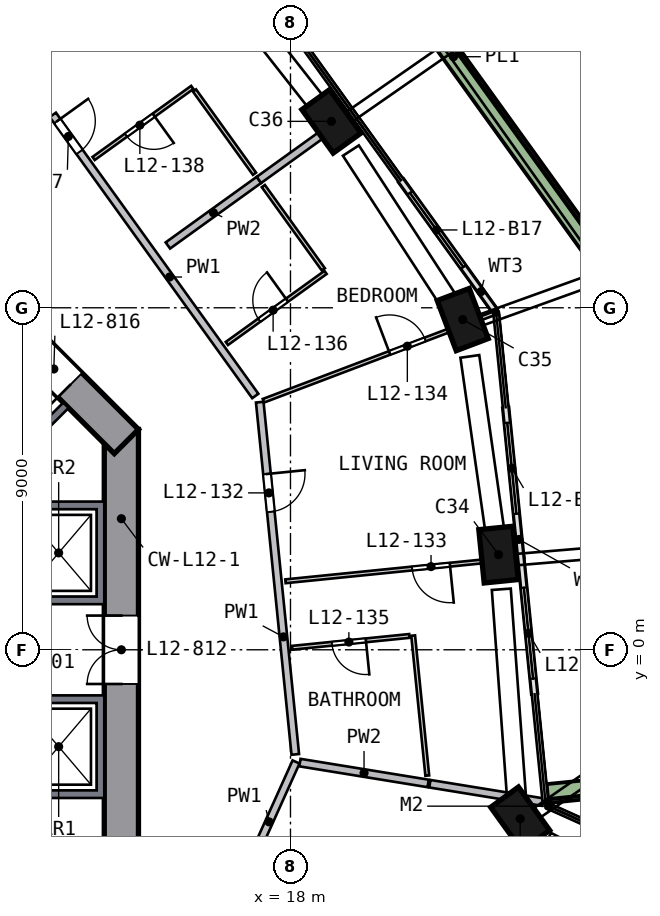
"""IFC4 building model, lengths in metres.
Left out: names, types, materials, properties, quantities, classifications, styles, units other than length and angle.
Written with IfcOpenShell. Run it as: python <this file> out.ifc"""

import sys

from ifc_helpers import new_model, si_unit, direction, frame, frame_2d, origin, origin_2d, place, context, subcontext, project, spatial, polyline, rectangle, outline, extrude, element, fill, save


model = new_model("IFC4")
c1 = context("Model", 3, precision=1e-05, world=origin(), true_north=direction((0.0, 1.0)))
c2 = subcontext(c1, "Body", "Model", "MODEL_VIEW")
j1 = project(units=[si_unit("LENGTHUNIT", "METRE"), si_unit("PLANEANGLEUNIT", "RADIAN")], contexts=[c1])
p1 = place(None, origin())
s1 = spatial("IfcSite", under=j1, at=p1, CompositionType="ELEMENT")
p2 = place(p1, origin())
s2 = spatial("IfcBuilding", under=s1, at=p2, CompositionType="ELEMENT")
p3 = place(p2, frame((0.0, 0.0, 56.5)))
s3 = spatial("IfcBuildingStorey", under=s2, at=p3, CompositionType="ELEMENT", Elevation=56.5)
p4 = place(p3, frame((24.02, -4.586, 0.0), z_axis=(0.020828195, 0.114403043, 0.993216054), x_axis=(0.588137095, -0.804758769, 0.080362191)))
e1 = element("IfcColumn", 1, at=p4, inside=s3, PredefinedType="COLUMN", context=c2, shape_type="SweptSolid", body=[
    extrude(rectangle(XDim=1.4, YDim=0.9, at=origin_2d()), origin(), (0.0, 0.0, 1.0), 3.212),
])
p5 = place(p3, frame((23.489, 2.369, 0.0), z_axis=(-0.012168058, 0.111641928, 0.993674), x_axis=(-0.09927897, 0.988702484, -0.112299088)))
e2 = element("IfcColumn", 2, at=p5, inside=s3, PredefinedType="COLUMN", context=c2, shape_type="SweptSolid", body=[
    extrude(rectangle(XDim=1.4, YDim=0.9, at=origin_2d()), origin(), (0.0, 0.0, 1.0), 3.21),
])
p6 = place(p3, frame((22.583, 8.561, 0.0), z_axis=(-0.041587396, 0.10704763, 0.993383759), x_axis=(0.351857103, -0.928982675, 0.11483801)))
e3 = element("IfcColumn", 3, at=p6, inside=s3, PredefinedType="COLUMN", context=c2, shape_type="SweptSolid", body=[
    extrude(rectangle(XDim=1.4, YDim=0.9, at=origin_2d()), origin(), (0.0, 0.0, 1.0), 3.211),
])
p7 = place(p3, frame((19.157, 13.796, 0.0), z_axis=(-0.066391509, 0.090651408, 0.993667193), x_axis=(-0.580299679, 0.806614945, -0.112359302)))
e4 = element("IfcColumn", 4, at=p7, inside=s3, PredefinedType="COLUMN", context=c2, shape_type="SweptSolid", body=[
    extrude(rectangle(XDim=1.4, YDim=0.9, at=origin_2d()), origin(), (0.0, 0.0, 1.0), 3.21),
])
p8 = place(p3, frame((13.55, -5.799, 0.0), z_axis=(0.0, 0.0, 1.0), x_axis=(0.0, 1.0, 0.0)))
e5 = element("IfcWall", 5, at=p8, inside=s3, PredefinedType="SHEAR", context=c2, shape_type="SweptSolid", body=[
    extrude(rectangle(XDim=11.598, YDim=0.9, at=frame_2d((5.799, 0.0))), origin(), (0.0, 0.0, 1.0), 3.5),
])
p9 = place(p8, frame((4.899, 0.0, 0.0)))
e6 = element("IfcOpeningElement", 6, at=p9, cuts=e5, PredefinedType="OPENING", context=c2, shape_type="SweptSolid", body=[
    extrude(rectangle(XDim=1.8, YDim=2.1, at=frame_2d((0.9, 1.05))), frame((0.0, 0.46, 0.0), z_axis=(0.0, -1.0, 0.0), x_axis=(1.0, 0.0, 0.0)), (0.0, 0.0, 1.0), 0.92),
])
p10 = place(p3, frame((13.682, 5.481, 0.0), z_axis=(0.0, 0.0, 1.0), x_axis=(-0.707106781, 0.707106781, 0.0)))
e7 = element("IfcWall", 7, at=p10, inside=s3, PredefinedType="SHEAR", context=c2, shape_type="SweptSolid", body=[
    extrude(rectangle(XDim=11.598, YDim=0.9, at=frame_2d((5.799, 0.0))), origin(), (0.0, 0.0, 1.0), 3.5),
])
p11 = place(p10, frame((2.099, 0.0, 0.0)))
e8 = element("IfcOpeningElement", 8, at=p11, cuts=e7, PredefinedType="OPENING", context=c2, shape_type="SweptSolid", body=[
    extrude(rectangle(XDim=1.2, YDim=2.1, at=frame_2d((0.6, 1.05))), frame((0.0, 0.46, 0.0), z_axis=(0.0, -1.0, 0.0), x_axis=(1.0, 0.0, 0.0)), (0.0, 0.0, 1.0), 0.92),
])
p12 = place(p3, frame((24.423, -1.155, 0.0), z_axis=(0.0, 0.0, 1.0), x_axis=(-0.100369865, 0.994950195, 0.0)))
e9 = element("IfcWall", 9, at=p12, inside=s3, PredefinedType="SOLIDWALL", context=c2, shape_type="SweptSolid", body=[
    extrude(rectangle(XDim=3.6, YDim=0.15, at=frame_2d((1.8, 0.0))), origin(), (0.0, 0.0, 1.0), 2.425),
])
p13 = place(p12, frame((0.4, 0.0, 0.0)))
e10 = element("IfcOpeningElement", 10, at=p13, cuts=e9, PredefinedType="OPENING", context=c2, shape_type="SweptSolid", body=[
    extrude(rectangle(XDim=2.4, YDim=2.4, at=frame_2d((1.2, 1.2))), frame((0.0, 0.085, 0.0), z_axis=(0.0, -1.0, 0.0), x_axis=(1.0, 0.0, 0.0)), (0.0, 0.0, 1.0), 0.17),
])
p14 = place(p3, frame((24.061, 2.427, 0.0), z_axis=(0.0, 0.0, 1.0), x_axis=(-0.100352013, 0.994951996, 0.0)))
e11 = element("IfcWall", 11, at=p14, inside=s3, PredefinedType="SOLIDWALL", context=c2, shape_type="SweptSolid", body=[
    extrude(rectangle(XDim=3.961, YDim=0.15, at=frame_2d((1.98, 0.0))), origin(), (0.0, 0.0, 1.0), 2.425),
])
p15 = place(p14, frame((1.16, 0.0, 0.0)))
e12 = element("IfcOpeningElement", 12, at=p15, cuts=e11, PredefinedType="OPENING", context=c2, shape_type="SweptSolid", body=[
    extrude(rectangle(XDim=2.4, YDim=2.4, at=frame_2d((1.2, 1.2))), frame((0.0, 0.085, 0.0), z_axis=(0.0, -1.0, 0.0), x_axis=(1.0, 0.0, 0.0)), (0.0, 0.0, 1.0), 0.17),
])
p16 = place(p3, frame((23.364, 8.939, 0.0), z_axis=(0.0, 0.0, 1.0), x_axis=(-0.584369059, 0.811488018, 0.0)))
e13 = element("IfcWall", 13, at=p16, inside=s3, PredefinedType="SOLIDWALL", context=c2, shape_type="SweptSolid", body=[
    extrude(rectangle(XDim=4.199, YDim=0.15, at=frame_2d((2.099, 0.0))), origin(), (0.0, 0.0, 1.0), 2.425),
])
p17 = place(p16, frame((1.399, 0.0, 0.0)))
e14 = element("IfcOpeningElement", 14, at=p17, cuts=e13, PredefinedType="OPENING", context=c2, shape_type="SweptSolid", body=[
    extrude(rectangle(XDim=2.4, YDim=2.4, at=frame_2d((1.2, 1.2))), frame((0.0, 0.085, 0.0), z_axis=(0.0, -1.0, 0.0), x_axis=(1.0, 0.0, 0.0)), (0.0, 0.0, 1.0), 0.17),
])
p18 = place(p3, frame((24.764, -3.784, 0.0), z_axis=(0.0, 0.0, 1.0), x_axis=(0.994951439, 0.100357532, 0.0)))
e15 = element("IfcWall", 15, at=p18, inside=s3, PredefinedType="SOLIDWALL", context=c2, shape_type="SweptSolid", body=[
    extrude(rectangle(XDim=3.199, YDim=0.5, at=frame_2d((1.6, 0.0))), origin(), (0.0, 0.0, 1.0), 0.7),
])
p19 = place(p3, frame((26.3, 10.039, 0.0), z_axis=(0.0, 0.0, 1.0), x_axis=(-0.5843858, 0.811475962, 0.0)))
e16 = element("IfcWall", 16, at=p19, inside=s3, PredefinedType="SOLIDWALL", context=c2, shape_type="SweptSolid", body=[
    extrude(rectangle(XDim=13.723, YDim=0.5, at=frame_2d((6.862, 0.0))), origin(), (0.0, 0.0, 1.0), 0.7),
])
p20 = place(p3, origin())
e17 = element("IfcWall", 17, at=p20, inside=s3, PredefinedType="SOLIDWALL", context=c2, shape_type="SweptSolid", body=[
    extrude(outline(polyline([(13.1, -3.9), (10.9, -3.9), (10.9, -3.7), (12.9, -3.7), (12.9, -1.4), (10.9, -1.4), (10.9, -1.2), (13.1, -1.2), (13.1, -3.9)])), origin(), (0.0, 0.0, 1.0), 3.19),
])
p21 = place(p3, origin())
e18 = element("IfcWall", 18, at=p21, inside=s3, PredefinedType="SOLIDWALL", context=c2, shape_type="SweptSolid", body=[
    extrude(outline(polyline([(13.1, 3.9), (13.1, 1.2), (10.9, 1.2), (10.9, 1.4), (12.9, 1.4), (12.9, 3.7), (10.9, 3.7), (10.9, 3.9), (13.1, 3.9)])), origin(), (0.0, 0.0, 1.0), 3.19),
])
for number, where, z_axis, x_axis in (
    (19, (9.334, 3.677, 0.0), (0.0, 0.0, 1.0), (0.707, 0.707, 0.0)),
    (20, (9.334, -3.677, 0.0), (0.0, 0.0, 1.0), (0.707, -0.707, 0.0)),
):
    element("IfcWall", number, at=place(p3, frame(where, z_axis=z_axis, x_axis=x_axis)), inside=s3, PredefinedType="SOLIDWALL", context=c2, shape_type="SweptSolid", body=[
        extrude(rectangle(XDim=3.9, YDim=0.2, at=frame_2d((1.95, 0.0))), origin(), (0.0, 0.0, 1.0), 3.19),
    ])
p22 = place(p3, frame((11.747, 14.076, 0.0), z_axis=(0.0, 0.0, 1.0), x_axis=(0.584392911, -0.811470841, 0.0)))
e21 = element("IfcWall", 21, at=p22, inside=s3, PredefinedType="SOLIDWALL", context=c2, shape_type="SweptSolid", body=[
    extrude(rectangle(XDim=9.116, YDim=0.2, at=frame_2d((4.558, 0.0))), origin(), (0.0, 0.0, 1.0), 3.19),
])
p23 = place(p22, frame((0.2, 0.0, 0.0)))
e22 = element("IfcOpeningElement", 22, at=p23, cuts=e21, PredefinedType="OPENING", context=c2, shape_type="SweptSolid", body=[
    extrude(rectangle(XDim=1.0, YDim=2.1, at=frame_2d((0.5, 1.05))), frame((0.0, 0.11, 0.0), z_axis=(0.0, -1.0, 0.0), x_axis=(1.0, 0.0, 0.0)), (0.0, 0.0, 1.0), 0.22),
])
p24 = place(p3, frame((16.726, -6.105, 0.0), z_axis=(0.0, 0.0, 1.0), x_axis=(0.410561327, 0.911832988, 0.0)))
e23 = element("IfcWall", 23, at=p24, inside=s3, PredefinedType="SOLIDWALL", context=c2, shape_type="SweptSolid", body=[
    extrude(rectangle(XDim=3.458, YDim=0.2, at=frame_2d((1.729, 0.0))), origin(), (0.0, 0.0, 1.0), 3.19),
])
p25 = place(p3, frame((17.191, 6.517, 0.0), z_axis=(0.0, 0.0, 1.0), x_axis=(0.100362456, -0.994950942, 0.0)))
e24 = element("IfcWall", 24, at=p25, inside=s3, PredefinedType="SOLIDWALL", context=c2, shape_type="SweptSolid", body=[
    extrude(rectangle(XDim=9.317, YDim=0.2, at=frame_2d((4.658, 0.0))), origin(), (0.0, 0.0, 1.0), 3.19),
])
p26 = place(p25, frame((1.9, 0.0, 0.0)))
e25 = element("IfcOpeningElement", 25, at=p26, cuts=e24, PredefinedType="OPENING", context=c2, shape_type="SweptSolid", body=[
    extrude(rectangle(XDim=1.0, YDim=2.1, at=frame_2d((0.5, 1.05))), frame((0.0, 0.11, 0.0), z_axis=(0.0, -1.0, 0.0), x_axis=(1.0, 0.0, 0.0)), (0.0, 0.0, 1.0), 0.22),
])
p27 = place(p3, frame((14.773, 10.639, 0.0), z_axis=(0.0, 0.0, 1.0), x_axis=(0.811487293, 0.584370065, 0.0)))
e26 = element("IfcWall", 26, at=p27, inside=s3, PredefinedType="SOLIDWALL", context=c2, shape_type="SweptSolid", body=[
    extrude(rectangle(XDim=2.953, YDim=0.2, at=frame_2d((1.477, 0.0))), origin(), (0.0, 0.0, 1.0), 3.19),
])
p28 = place(p3, frame((17.169, 12.365, 0.0), z_axis=(0.0, 0.0, 1.0), x_axis=(0.811479396, 0.584381032, 0.0)))
e27 = element("IfcWall", 27, at=p28, inside=s3, PredefinedType="SOLIDWALL", context=c2, shape_type="SweptSolid", body=[
    extrude(rectangle(XDim=2.95, YDim=0.2, at=frame_2d((1.475, 0.0))), origin(), (0.0, 0.0, 1.0), 3.19),
])
p29 = place(p3, frame((18.248, -2.969, 0.0), z_axis=(0.0, 0.0, 1.0), x_axis=(0.987029122, -0.160541311, 0.0)))
e28 = element("IfcWall", 28, at=p29, inside=s3, PredefinedType="SOLIDWALL", context=c2, shape_type="SweptSolid", body=[
    extrude(rectangle(XDim=3.419, YDim=0.2, at=frame_2d((1.709, 0.0))), origin(), (0.0, 0.0, 1.0), 3.19),
])
p30 = place(p3, frame((21.668, -3.525, 0.0), z_axis=(0.0, 0.0, 1.0), x_axis=(0.987019825, -0.160598462, 0.0)))
e29 = element("IfcWall", 29, at=p30, inside=s3, PredefinedType="SOLIDWALL", context=c2, shape_type="SweptSolid", body=[
    extrude(rectangle(XDim=3.011, YDim=0.2, at=frame_2d((1.506, 0.0))), origin(), (0.0, 0.0, 1.0), 3.19),
])
p31 = place(p3, frame((15.416, 14.799, 0.0), z_axis=(0.0, 0.0, 1.0), x_axis=(-0.811459086, -0.584409233, 0.0)))
e30 = element("IfcWall", 30, at=p31, inside=s3, PredefinedType="PARTITIONING", context=c2, shape_type="SweptSolid", body=[
    extrude(rectangle(XDim=3.2, YDim=0.1, at=frame_2d((1.6, 0.0))), origin(), (0.0, 0.0, 1.0), 3.19),
])
p32 = place(p31, frame((1.25, 0.0, 0.0)))
e31 = element("IfcOpeningElement", 31, at=p32, cuts=e30, PredefinedType="OPENING", context=c2, shape_type="SweptSolid", body=[
    extrude(rectangle(XDim=0.9, YDim=2.1, at=frame_2d((0.45, 1.05))), frame((0.0, 0.06, 0.0), z_axis=(0.0, -1.0, 0.0), x_axis=(1.0, 0.0, 0.0)), (0.0, 0.0, 1.0), 0.12),
])
p33 = place(p3, frame((15.475, 14.718, 0.0), z_axis=(0.0, 0.0, 1.0), x_axis=(0.58440715, -0.811460586, 0.0)))
e32 = element("IfcWall", 32, at=p33, inside=s3, PredefinedType="PARTITIONING", context=c2, shape_type="SweptSolid", body=[
    extrude(rectangle(XDim=2.7, YDim=0.1, at=frame_2d((1.35, 0.0))), origin(), (0.0, 0.0, 1.0), 3.19),
])
p34 = place(p3, frame((16.326, 8.06, 0.0), z_axis=(0.0, 0.0, 1.0), x_axis=(0.811459086, 0.584409233, 0.0)))
e33 = element("IfcWall", 33, at=p34, inside=s3, PredefinedType="PARTITIONING", context=c2, shape_type="SweptSolid", body=[
    extrude(rectangle(XDim=3.2, YDim=0.1, at=frame_2d((1.6, 0.0))), origin(), (0.0, 0.0, 1.0), 3.19),
])
p35 = place(p34, frame((1.05, 0.0, 0.0)))
e34 = element("IfcOpeningElement", 34, at=p35, cuts=e33, PredefinedType="OPENING", context=c2, shape_type="SweptSolid", body=[
    extrude(rectangle(XDim=0.9, YDim=2.1, at=frame_2d((0.45, 1.05))), frame((0.0, 0.06, 0.0), z_axis=(0.0, -1.0, 0.0), x_axis=(1.0, 0.0, 0.0)), (0.0, 0.0, 1.0), 0.12),
])
p36 = place(p3, frame((18.864, 10.011, 0.0), z_axis=(0.0, 0.0, 1.0), x_axis=(-0.584347605, 0.811503467, 0.0)))
e35 = element("IfcWall", 35, at=p36, inside=s3, PredefinedType="PARTITIONING", context=c2, shape_type="SweptSolid", body=[
    extrude(rectangle(XDim=2.7, YDim=0.1, at=frame_2d((1.35, 0.0))), origin(), (0.0, 0.0, 1.0), 3.19),
])
p37 = place(p3, frame((21.128, 0.364, 0.0), z_axis=(0.0, 0.0, 1.0), x_axis=(-0.994953403, -0.100338054, 0.0)))
e36 = element("IfcWall", 36, at=p37, inside=s3, PredefinedType="PARTITIONING", context=c2, shape_type="SweptSolid", body=[
    extrude(rectangle(XDim=3.1, YDim=0.1, at=frame_2d((1.55, 0.0))), origin(), (0.0, 0.0, 1.0), 3.19),
])
p38 = place(p37, frame((1.15, 0.0, 0.0)))
e37 = element("IfcOpeningElement", 37, at=p38, cuts=e36, PredefinedType="OPENING", context=c2, shape_type="SweptSolid", body=[
    extrude(rectangle(XDim=0.9, YDim=2.1, at=frame_2d((0.45, 1.05))), frame((0.0, 0.06, 0.0), z_axis=(0.0, -1.0, 0.0), x_axis=(1.0, 0.0, 0.0)), (0.0, 0.0, 1.0), 0.12),
])
p39 = place(p3, frame((17.288, 6.553, 0.0), z_axis=(0.0, 0.0, 1.0), x_axis=(0.935072944, 0.354455341, 0.0)))
e38 = element("IfcWall", 38, at=p39, inside=s3, PredefinedType="PARTITIONING", context=c2, shape_type="SweptSolid", body=[
    extrude(rectangle(XDim=6.476, YDim=0.1, at=frame_2d((3.238, 0.0))), origin(), (0.0, 0.0, 1.0), 3.19),
])
p40 = place(p39, frame((3.55, 0.0, 0.0)))
e39 = element("IfcOpeningElement", 39, at=p40, cuts=e38, PredefinedType="OPENING", context=c2, shape_type="SweptSolid", body=[
    extrude(rectangle(XDim=1.0, YDim=2.1, at=frame_2d((0.5, 1.05))), frame((0.0, 0.06, 0.0), z_axis=(0.0, -1.0, 0.0), x_axis=(1.0, 0.0, 0.0)), (0.0, 0.0, 1.0), 0.12),
])
p41 = place(p3, frame((23.987, 2.42, 0.0), z_axis=(0.0, 0.0, 1.0), x_axis=(-0.994947568, -0.100395898, 0.0)))
e40 = element("IfcWall", 40, at=p41, inside=s3, PredefinedType="PARTITIONING", context=c2, shape_type="SweptSolid", body=[
    extrude(rectangle(XDim=6.15, YDim=0.1, at=frame_2d((3.075, 0.0))), origin(), (0.0, 0.0, 1.0), 3.19),
])
p42 = place(p41, frame((1.8, 0.0, 0.0)))
e41 = element("IfcOpeningElement", 41, at=p42, cuts=e40, PredefinedType="OPENING", context=c2, shape_type="SweptSolid", body=[
    extrude(rectangle(XDim=1.0, YDim=2.1, at=frame_2d((0.5, 1.05))), frame((0.0, 0.06, 0.0), z_axis=(0.0, -1.0, 0.0), x_axis=(1.0, 0.0, 0.0)), (0.0, 0.0, 1.0), 0.12),
])
p43 = place(p3, frame((21.6, -3.311, 0.0), z_axis=(0.0, 0.0, 1.0), x_axis=(-0.100319439, 0.99495528, 0.0)))
e42 = element("IfcWall", 42, at=p43, inside=s3, PredefinedType="PARTITIONING", context=c2, shape_type="SweptSolid", body=[
    extrude(rectangle(XDim=3.704, YDim=0.1, at=frame_2d((1.852, 0.0))), origin(), (0.0, 0.0, 1.0), 3.19),
])
p44 = place(p13, origin())
e43 = element("IfcDoor", 43, at=p44, inside=s3, OperationType="SLIDING_TO_RIGHT", PredefinedType="DOOR", context=c2, shape_type="SweptSolid", body=[
    extrude(rectangle(XDim=2.4, YDim=2.4, at=frame_2d((1.2, 1.2))), frame((0.0, 0.025, 0.0), z_axis=(0.0, -1.0, 0.0), x_axis=(1.0, 0.0, 0.0)), (0.0, 0.0, 1.0), 0.05),
])
fill(e10, e43)
p45 = place(p15, origin())
e44 = element("IfcDoor", 44, at=p45, inside=s3, OperationType="SLIDING_TO_LEFT", PredefinedType="DOOR", context=c2, shape_type="SweptSolid", body=[
    extrude(rectangle(XDim=2.4, YDim=2.4, at=frame_2d((1.2, 1.2))), frame((0.0, 0.025, 0.0), z_axis=(0.0, -1.0, 0.0), x_axis=(1.0, 0.0, 0.0)), (0.0, 0.0, 1.0), 0.05),
])
fill(e12, e44)
p46 = place(p17, origin())
e45 = element("IfcDoor", 45, at=p46, inside=s3, OperationType="SLIDING_TO_LEFT", PredefinedType="DOOR", context=c2, shape_type="SweptSolid", body=[
    extrude(rectangle(XDim=2.4, YDim=2.4, at=frame_2d((1.2, 1.2))), frame((0.0, 0.025, 0.0), z_axis=(0.0, -1.0, 0.0), x_axis=(1.0, 0.0, 0.0)), (0.0, 0.0, 1.0), 0.05),
])
fill(e14, e45)
p47 = place(p9, origin())
e46 = element("IfcDoor", 46, at=p47, inside=s3, OperationType="DOUBLE_DOOR_SINGLE_SWING", PredefinedType="DOOR", context=c2, shape_type="SweptSolid", body=[
    extrude(rectangle(XDim=1.8, YDim=2.1, at=frame_2d((0.9, 1.05))), frame((0.0, 0.025, 0.0), z_axis=(0.0, -1.0, 0.0), x_axis=(1.0, 0.0, 0.0)), (0.0, 0.0, 1.0), 0.05),
])
fill(e6, e46)
p48 = place(p11, origin())
e47 = element("IfcDoor", 47, at=p48, inside=s3, OperationType="SINGLE_SWING_LEFT", PredefinedType="DOOR", context=c2, shape_type="SweptSolid", body=[
    extrude(rectangle(XDim=1.2, YDim=2.1, at=frame_2d((0.6, 1.05))), frame((0.0, 0.025, 0.0), z_axis=(0.0, -1.0, 0.0), x_axis=(1.0, 0.0, 0.0)), (0.0, 0.0, 1.0), 0.05),
])
fill(e8, e47)
p49 = place(p26, origin())
e48 = element("IfcDoor", 48, at=p49, inside=s3, OperationType="SINGLE_SWING_LEFT", PredefinedType="DOOR", context=c2, shape_type="SweptSolid", body=[
    extrude(rectangle(XDim=1.0, YDim=2.1, at=frame_2d((0.5, 1.05))), frame((0.0, 0.025, 0.0), z_axis=(0.0, -1.0, 0.0), x_axis=(1.0, 0.0, 0.0)), (0.0, 0.0, 1.0), 0.05),
])
fill(e25, e48)
p50 = place(p42, origin())
e49 = element("IfcDoor", 49, at=p50, inside=s3, OperationType="SINGLE_SWING_LEFT", PredefinedType="DOOR", context=c2, shape_type="SweptSolid", body=[
    extrude(rectangle(XDim=1.0, YDim=2.1, at=frame_2d((0.5, 1.05))), frame((0.0, 0.025, 0.0), z_axis=(0.0, -1.0, 0.0), x_axis=(1.0, 0.0, 0.0)), (0.0, 0.0, 1.0), 0.05),
])
fill(e41, e49)
p51 = place(p40, origin())
e50 = element("IfcDoor", 50, at=p51, inside=s3, OperationType="SINGLE_SWING_LEFT", PredefinedType="DOOR", context=c2, shape_type="SweptSolid", body=[
    extrude(rectangle(XDim=1.0, YDim=2.1, at=frame_2d((0.5, 1.05))), frame((0.0, 0.025, 0.0), z_axis=(0.0, -1.0, 0.0), x_axis=(1.0, 0.0, 0.0)), (0.0, 0.0, 1.0), 0.05),
])
fill(e39, e50)
p52 = place(p38, origin())
e51 = element("IfcDoor", 51, at=p52, inside=s3, OperationType="SINGLE_SWING_LEFT", PredefinedType="DOOR", context=c2, shape_type="SweptSolid", body=[
    extrude(rectangle(XDim=0.9, YDim=2.1, at=frame_2d((0.45, 1.05))), frame((0.0, 0.025, 0.0), z_axis=(0.0, -1.0, 0.0), x_axis=(1.0, 0.0, 0.0)), (0.0, 0.0, 1.0), 0.05),
])
fill(e37, e51)
p53 = place(p35, origin())
e52 = element("IfcDoor", 52, at=p53, inside=s3, OperationType="SINGLE_SWING_RIGHT", PredefinedType="DOOR", context=c2, shape_type="SweptSolid", body=[
    extrude(rectangle(XDim=0.9, YDim=2.1, at=frame_2d((0.45, 1.05))), frame((0.0, 0.025, 0.0), z_axis=(0.0, -1.0, 0.0), x_axis=(1.0, 0.0, 0.0)), (0.0, 0.0, 1.0), 0.05),
])
fill(e34, e52)
p54 = place(p23, origin())
e53 = element("IfcDoor", 53, at=p54, inside=s3, OperationType="SINGLE_SWING_LEFT", PredefinedType="DOOR", context=c2, shape_type="SweptSolid", body=[
    extrude(rectangle(XDim=1.0, YDim=2.1, at=frame_2d((0.5, 1.05))), frame((0.0, 0.025, 0.0), z_axis=(0.0, -1.0, 0.0), x_axis=(1.0, 0.0, 0.0)), (0.0, 0.0, 1.0), 0.05),
])
fill(e22, e53)
p55 = place(p32, origin())
e54 = element("IfcDoor", 54, at=p55, inside=s3, OperationType="SINGLE_SWING_LEFT", PredefinedType="DOOR", context=c2, shape_type="SweptSolid", body=[
    extrude(rectangle(XDim=0.9, YDim=2.1, at=frame_2d((0.45, 1.05))), frame((0.0, 0.025, 0.0), z_axis=(0.0, -1.0, 0.0), x_axis=(1.0, 0.0, 0.0)), (0.0, 0.0, 1.0), 0.05),
])
fill(e31, e54)
save(model, sys.argv[1])
